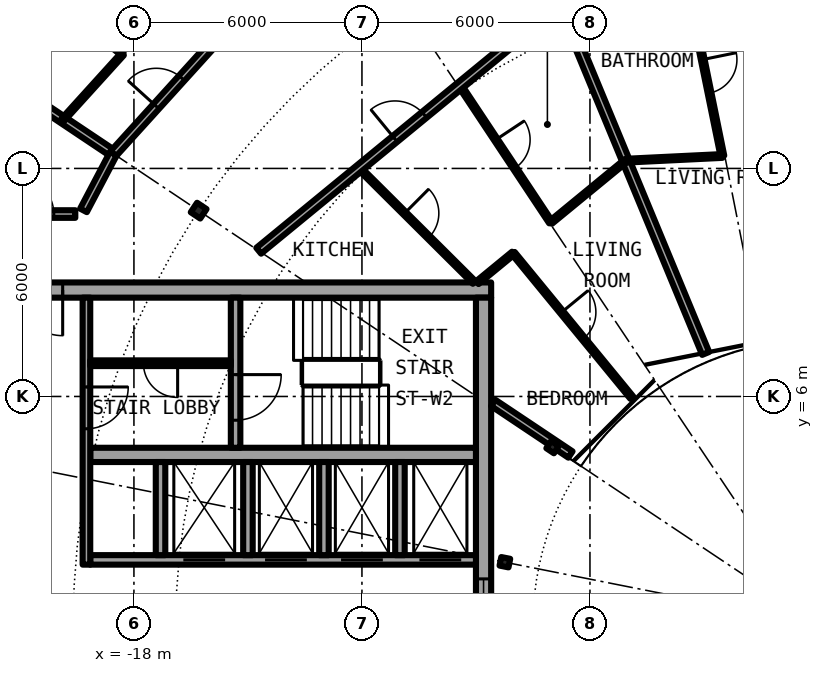
"""IFC4 building model, lengths in metres.
Left out: names, types, materials, properties, quantities, classifications, styles, units other than length and angle.
Written with IfcOpenShell. Run it as: python <this file> out.ifc"""

import sys

from ifc_helpers import new_model, si_unit, direction, frame, frame_2d, origin, origin_2d, place, context, subcontext, project, spatial, rectangle, i_section, extrude, element, fill, save


model = new_model("IFC4")
c1 = context("Model", 3, precision=1e-05, world=origin(), true_north=direction((0.0, 1.0)))
c2 = subcontext(c1, "Body", "Model", "MODEL_VIEW")
j1 = project(units=[si_unit("LENGTHUNIT", "METRE"), si_unit("PLANEANGLEUNIT", "RADIAN")], contexts=[c1])
p1 = place(None, origin())
s1 = spatial("IfcSite", under=j1, at=p1, CompositionType="ELEMENT")
p2 = place(p1, origin())
s2 = spatial("IfcBuilding", under=s1, at=p2, CompositionType="ELEMENT")
p3 = place(p2, frame((0.0, 0.0, 234.05)))
s3 = spatial("IfcBuildingStorey", under=s2, at=p3, CompositionType="ELEMENT", Elevation=234.05)
p4 = place(p3, frame((-16.297, 10.889, 0.0), z_axis=(0.0, 0.0, 1.0), x_axis=(-0.831469612303, 0.55557023302, 0.0)))
e1 = element("IfcColumn", 1, at=p4, inside=s3, PredefinedType="COLUMN", context=c2, shape_type="SweptSolid", body=[
    extrude(i_section(OverallWidth=0.3, OverallDepth=0.3, WebThickness=0.011, FlangeThickness=0.019, FilletRadius=0.027, at=origin_2d()), origin(), (0.0, 0.0, 1.0), 3.05),
])
for number, where, z_axis, x_axis in (
    (2, (-6.984, 4.667, 0.0), (0.0, 0.0, 1.0), (-0.831, 0.556, 0.0)),
    (3, (-8.239, 1.639, 0.0), (0.0, 0.0, 1.0), (-0.981, 0.195, 0.0)),
):
    element("IfcColumn", number, at=place(p3, frame(where, z_axis=z_axis, x_axis=x_axis)), inside=s3, PredefinedType="COLUMN", context=c2, shape_type="SweptSolid", body=[
        extrude(i_section(OverallWidth=0.24, OverallDepth=0.23, WebThickness=0.008, FlangeThickness=0.012, FilletRadius=0.021, at=origin_2d()), origin(), (0.0, 0.0, 1.0), 3.05),
    ])
p5 = place(p3, frame((-8.6, 8.8, 0.0), z_axis=(0.0, 0.0, 1.0), x_axis=(-1.0, 0.0, 0.0)))
e4 = element("IfcWall", 4, at=p5, inside=s3, PredefinedType="SHEAR", context=c2, shape_type="SweptSolid", body=[
    extrude(rectangle(XDim=13.4, YDim=0.4, at=frame_2d((6.7, 0.0))), origin(), (0.0, 0.0, 1.0), 3.05),
])
p6 = place(p5, frame((11.275, 0.0, 0.0)))
e5 = element("IfcOpeningElement", 5, at=p6, cuts=e4, PredefinedType="OPENING", context=c2, shape_type="SweptSolid", body=[
    extrude(rectangle(XDim=1.2, YDim=2.3, at=frame_2d((0.6, 1.15))), frame((0.0, 0.21, 0.0), z_axis=(0.0, -1.0, 0.0), x_axis=(1.0, 0.0, 0.0)), (0.0, 0.0, 1.0), 0.42),
])
p7 = place(p3, frame((-8.8, 8.6, 0.0), z_axis=(0.0, 0.0, 1.0), x_axis=(0.0, -1.0, 0.0)))
e6 = element("IfcWall", 6, at=p7, inside=s3, PredefinedType="SHEAR", context=c2, shape_type="SweptSolid", body=[
    extrude(rectangle(XDim=17.2, YDim=0.4, at=frame_2d((8.6, 0.0))), origin(), (0.0, 0.0, 1.0), 3.05),
])
p8 = place(p7, frame((7.4, 0.0, 0.1)))
e7 = element("IfcOpeningElement", 7, at=p8, cuts=e6, PredefinedType="OPENING", context=c2, shape_type="SweptSolid", body=[
    extrude(rectangle(XDim=2.4, YDim=2.2, at=frame_2d((1.2, 1.1))), frame((0.0, 0.21, 0.0), z_axis=(0.0, -1.0, 0.0), x_axis=(1.0, 0.0, 0.0)), (0.0, 0.0, 1.0), 0.42),
])
p9 = place(p3, frame((-9.0, 1.7, 0.0), z_axis=(0.0, 0.0, 1.0), x_axis=(-1.0, 0.0, 0.0)))
e8 = element("IfcWall", 8, at=p9, inside=s3, PredefinedType="SHEAR", context=c2, shape_type="SweptSolid", body=[
    extrude(rectangle(XDim=10.15, YDim=0.25, at=frame_2d((5.075, 0.0))), origin(), (0.0, 0.0, 1.0), 3.05),
])
p10 = place(p9, frame((0.387, 0.0, 0.0)))
e9 = element("IfcOpeningElement", 9, at=p10, cuts=e8, PredefinedType="OPENING", context=c2, shape_type="SweptSolid", body=[
    extrude(rectangle(XDim=1.1, YDim=2.3, at=frame_2d((0.55, 1.15))), frame((0.0, 0.135, 0.0), z_axis=(0.0, -1.0, 0.0), x_axis=(1.0, 0.0, 0.0)), (0.0, 0.0, 1.0), 0.27),
])
p11 = place(p9, frame((2.45, 0.0, 0.0)))
e10 = element("IfcOpeningElement", 10, at=p11, cuts=e8, PredefinedType="OPENING", context=c2, shape_type="SweptSolid", body=[
    extrude(rectangle(XDim=1.1, YDim=2.3, at=frame_2d((0.55, 1.15))), frame((0.0, 0.135, 0.0), z_axis=(0.0, -1.0, 0.0), x_axis=(1.0, 0.0, 0.0)), (0.0, 0.0, 1.0), 0.27),
])
p12 = place(p9, frame((4.45, 0.0, 0.0)))
e11 = element("IfcOpeningElement", 11, at=p12, cuts=e8, PredefinedType="OPENING", context=c2, shape_type="SweptSolid", body=[
    extrude(rectangle(XDim=1.1, YDim=2.3, at=frame_2d((0.55, 1.15))), frame((0.0, 0.135, 0.0), z_axis=(0.0, -1.0, 0.0), x_axis=(1.0, 0.0, 0.0)), (0.0, 0.0, 1.0), 0.27),
])
p13 = place(p9, frame((6.6, 0.0, 0.0)))
e12 = element("IfcOpeningElement", 12, at=p13, cuts=e8, PredefinedType="OPENING", context=c2, shape_type="SweptSolid", body=[
    extrude(rectangle(XDim=1.1, YDim=2.3, at=frame_2d((0.55, 1.15))), frame((0.0, 0.135, 0.0), z_axis=(0.0, -1.0, 0.0), x_axis=(1.0, 0.0, 0.0)), (0.0, 0.0, 1.0), 0.27),
])
p14 = place(p3, frame((-9.0, 4.462, 0.0), z_axis=(0.0, 0.0, 1.0), x_axis=(-1.0, 0.0, 0.0)))
e13 = element("IfcWall", 13, at=p14, inside=s3, PredefinedType="SHEAR", context=c2, shape_type="SweptSolid", body=[
    extrude(rectangle(XDim=10.15, YDim=0.375, at=frame_2d((5.075, 0.0))), origin(), (0.0, 0.0, 1.0), 3.05),
])
p15 = place(p3, frame((-15.325, 8.6, 0.0), z_axis=(0.0, 0.0, 1.0), x_axis=(0.0, -1.0, 0.0)))
e14 = element("IfcWall", 14, at=p15, inside=s3, PredefinedType="SHEAR", context=c2, shape_type="SweptSolid", body=[
    extrude(rectangle(XDim=3.95, YDim=0.25, at=frame_2d((1.975, 0.0))), origin(), (0.0, 0.0, 1.0), 3.05),
])
p16 = place(p15, frame((2.025, 0.0, 0.0)))
e15 = element("IfcOpeningElement", 15, at=p16, cuts=e14, PredefinedType="OPENING", context=c2, shape_type="SweptSolid", body=[
    extrude(rectangle(XDim=1.2, YDim=2.3, at=frame_2d((0.6, 1.15))), frame((0.0, 0.135, 0.0), z_axis=(0.0, -1.0, 0.0), x_axis=(1.0, 0.0, 0.0)), (0.0, 0.0, 1.0), 0.27),
])
for number, where, z_axis, x_axis in (
    (16, (-15.0, 1.825, 0.0), (0.0, 0.0, 1.0), (0.0, 1.0, 0.0)),
    (17, (-17.3, 1.825, 0.0), (0.0, 0.0, 1.0), (0.0, 1.0, 0.0)),
):
    element("IfcWall", number, at=place(p3, frame(where, z_axis=z_axis, x_axis=x_axis)), inside=s3, PredefinedType="SOLIDWALL", context=c2, shape_type="SweptSolid", body=[
        extrude(rectangle(XDim=2.45, YDim=0.25, at=frame_2d((1.225, 0.0))), origin(), (0.0, 0.0, 1.0), 2.7),
    ])
p17 = place(p3, frame((-19.25, 8.6, 0.0), z_axis=(0.0, 0.0, 1.0), x_axis=(0.0, -1.0, 0.0)))
e18 = element("IfcWall", 18, at=p17, inside=s3, PredefinedType="SOLIDWALL", context=c2, shape_type="SweptSolid", body=[
    extrude(rectangle(XDim=7.025, YDim=0.2, at=frame_2d((3.513, 0.0))), origin(), (0.0, 0.0, 1.0), 2.7),
])
p18 = place(p17, frame((2.35, 0.0, 0.0)))
e19 = element("IfcOpeningElement", 19, at=p18, cuts=e18, PredefinedType="OPENING", context=c2, shape_type="SweptSolid", body=[
    extrude(rectangle(XDim=1.1, YDim=2.3, at=frame_2d((0.55, 1.15))), frame((0.0, 0.11, 0.0), z_axis=(0.0, -1.0, 0.0), x_axis=(1.0, 0.0, 0.0)), (0.0, 0.0, 1.0), 0.22),
])
for number, where, z_axis, x_axis in (
    (20, (-11.0, 1.825, 0.0), (0.0, 0.0, 1.0), (0.0, 1.0, 0.0)),
    (21, (-13.0, 1.825, 0.0), (0.0, 0.0, 1.0), (0.0, 1.0, 0.0)),
):
    element("IfcWall", number, at=place(p3, frame(where, z_axis=z_axis, x_axis=x_axis)), inside=s3, PredefinedType="SOLIDWALL", context=c2, shape_type="SweptSolid", body=[
        extrude(rectangle(XDim=2.45, YDim=0.25, at=frame_2d((1.225, 0.0))), origin(), (0.0, 0.0, 1.0), 2.7),
    ])
p19 = place(p3, frame((-15.45, 6.875, 0.0), z_axis=(0.0, 0.0, 1.0), x_axis=(-1.0, 0.0, 0.0)))
e22 = element("IfcWall", 22, at=p19, inside=s3, PredefinedType="PARTITIONING", context=c2, shape_type="SweptSolid", body=[
    extrude(rectangle(XDim=3.7, YDim=0.15, at=frame_2d((1.85, 0.0))), origin(), (0.0, 0.0, 1.0), 2.7),
])
p20 = place(p19, frame((1.4, 0.0, 0.0)))
e23 = element("IfcOpeningElement", 23, at=p20, cuts=e22, PredefinedType="OPENING", context=c2, shape_type="SweptSolid", body=[
    extrude(rectangle(XDim=0.9, YDim=2.3, at=frame_2d((0.45, 1.15))), frame((0.0, 0.085, 0.0), z_axis=(0.0, -1.0, 0.0), x_axis=(1.0, 0.0, 0.0)), (0.0, 0.0, 1.0), 0.17),
])
p21 = place(p3, frame((-21.097, 14.097, 0.0), z_axis=(0.0, 0.0, 1.0), x_axis=(0.831340764735, -0.555763018642, 0.0)))
e24 = element("IfcWall", 24, at=p21, inside=s3, PredefinedType="PARTITIONING", context=c2, shape_type="SweptSolid", body=[
    extrude(rectangle(XDim=3.073, YDim=0.2, at=frame_2d((1.537, 0.0))), origin(), (0.0, 0.0, 1.0), 2.7),
])
p22 = place(p3, frame((-21.012, 17.233, 0.0), z_axis=(0.0, 0.0, 1.0), x_axis=(0.773165322764, -0.634204528267, 0.0)))
e25 = element("IfcWall", 25, at=p22, inside=s3, PredefinedType="PARTITIONING", context=c2, shape_type="SweptSolid", body=[
    extrude(rectangle(XDim=3.505, YDim=0.1, at=frame_2d((1.752, 0.0))), origin(), (0.0, 0.0, 1.0), 2.7),
])
p23 = place(p22, frame((1.303, 0.0, 0.0)))
e26 = element("IfcOpeningElement", 26, at=p23, cuts=e25, PredefinedType="OPENING", context=c2, shape_type="SweptSolid", body=[
    extrude(rectangle(XDim=0.9, YDim=2.3, at=frame_2d((0.45, 1.15))), frame((0.0, 0.06, 0.0), z_axis=(0.0, -1.0, 0.0), x_axis=(1.0, 0.0, 0.0)), (0.0, 0.0, 1.0), 0.12),
])
p24 = place(p3, frame((-12.069, 12.007, 0.0), z_axis=(0.0, 0.0, 1.0), x_axis=(0.708851268309, -0.705357979622, 0.0)))
e27 = element("IfcWall", 27, at=p24, inside=s3, PredefinedType="PARTITIONING", context=c2, shape_type="SweptSolid", body=[
    extrude(rectangle(XDim=4.263, YDim=0.1, at=frame_2d((2.132, 0.0))), origin(), (0.0, 0.0, 1.0), 2.7),
])
p25 = place(p24, frame((1.682, 0.0, 0.0)))
e28 = element("IfcOpeningElement", 28, at=p25, cuts=e27, PredefinedType="OPENING", context=c2, shape_type="SweptSolid", body=[
    extrude(rectangle(XDim=0.9, YDim=2.3, at=frame_2d((0.45, 1.15))), frame((0.0, 0.06, 0.0), z_axis=(0.0, -1.0, 0.0), x_axis=(1.0, 0.0, 0.0)), (0.0, 0.0, 1.0), 0.12),
])
p26 = place(p3, frame((-9.421, 14.18, 0.0), z_axis=(0.0, 0.0, 1.0), x_axis=(0.553303732327, -0.832979579457, 0.0)))
e29 = element("IfcWall", 29, at=p26, inside=s3, PredefinedType="PARTITIONING", context=c2, shape_type="SweptSolid", body=[
    extrude(rectangle(XDim=4.319, YDim=0.1, at=frame_2d((2.16, 0.0))), origin(), (0.0, 0.0, 1.0), 2.7),
])
p27 = place(p26, frame((1.71, 0.0, 0.0)))
e30 = element("IfcOpeningElement", 30, at=p27, cuts=e29, PredefinedType="OPENING", context=c2, shape_type="SweptSolid", body=[
    extrude(rectangle(XDim=0.9, YDim=2.3, at=frame_2d((0.45, 1.15))), frame((0.0, 0.06, 0.0), z_axis=(0.0, -1.0, 0.0), x_axis=(1.0, 0.0, 0.0)), (0.0, 0.0, 1.0), 0.12),
])
p28 = place(p3, frame((-8.019, 9.771, 0.0), z_axis=(0.0, 0.0, 1.0), x_axis=(0.634401778971, -0.773003481776, 0.0)))
e31 = element("IfcWall", 31, at=p28, inside=s3, PredefinedType="PARTITIONING", context=c2, shape_type="SweptSolid", body=[
    extrude(rectangle(XDim=4.92, YDim=0.1, at=frame_2d((2.46, 0.0))), origin(), (0.0, 0.0, 1.0), 2.7),
])
p29 = place(p28, frame((2.01, 0.0, 0.0)))
e32 = element("IfcOpeningElement", 32, at=p29, cuts=e31, PredefinedType="OPENING", context=c2, shape_type="SweptSolid", body=[
    extrude(rectangle(XDim=0.9, YDim=2.3, at=frame_2d((0.45, 1.15))), frame((0.0, 0.06, 0.0), z_axis=(0.0, -1.0, 0.0), x_axis=(1.0, 0.0, 0.0)), (0.0, 0.0, 1.0), 0.12),
])
p30 = place(p3, frame((-6.773, 16.353, 0.0), z_axis=(0.0, 0.0, 1.0), x_axis=(0.382549125466, -0.923935152814, 0.0)))
e33 = element("IfcWall", 33, at=p30, inside=s3, PredefinedType="PARTITIONING", context=c2, shape_type="SweptSolid", body=[
    extrude(rectangle(XDim=9.98, YDim=0.2, at=frame_2d((4.99, 0.0))), origin(), (0.0, 0.0, 1.0), 2.7),
])
p31 = place(p3, frame((-3.37, 16.52, 0.0), z_axis=(0.0, 0.0, 1.0), x_axis=(0.199889579004, -0.979818430224, 0.0)))
e34 = element("IfcWall", 34, at=p31, inside=s3, PredefinedType="PARTITIONING", context=c2, shape_type="SweptSolid", body=[
    extrude(rectangle(XDim=4.279, YDim=0.1, at=frame_2d((2.139, 0.0))), origin(), (0.0, 0.0, 1.0), 2.7),
])
p32 = place(p31, frame((1.689, 0.0, 0.0)))
e35 = element("IfcOpeningElement", 35, at=p32, cuts=e34, PredefinedType="OPENING", context=c2, shape_type="SweptSolid", body=[
    extrude(rectangle(XDim=0.9, YDim=2.3, at=frame_2d((0.45, 1.15))), frame((0.0, 0.06, 0.0), z_axis=(0.0, -1.0, 0.0), x_axis=(1.0, 0.0, 0.0)), (0.0, 0.0, 1.0), 0.12),
])
p33 = place(p3, frame((-6.513, 4.472, 0.0), z_axis=(0.0, 0.0, 1.0), x_axis=(-0.831450132577, 0.555599385382, 0.0)))
e36 = element("IfcWall", 36, at=p33, inside=s3, PredefinedType="PARTITIONING", context=c2, shape_type="SweptSolid", body=[
    extrude(rectangle(XDim=2.443, YDim=0.2, at=frame_2d((1.221, 0.0))), origin(), (0.0, 0.0, 1.0), 2.7),
])
p34 = place(p3, frame((-21.675, 10.8, 0.0), z_axis=(0.0, 0.0, 1.0), x_axis=(1.0, 0.0, 0.0)))
e37 = element("IfcWall", 37, at=p34, inside=s3, PredefinedType="PARTITIONING", context=c2, shape_type="SweptSolid", body=[
    extrude(rectangle(XDim=2.132, YDim=0.2, at=frame_2d((1.066, 0.0))), origin(), (0.0, 0.0, 1.0), 2.7),
])
p35 = place(p34, frame((0.566, 0.0, 0.0)))
e38 = element("IfcOpeningElement", 38, at=p35, cuts=e37, PredefinedType="OPENING", context=c2, shape_type="SweptSolid", body=[
    extrude(rectangle(XDim=1.0, YDim=2.3, at=frame_2d((0.5, 1.15))), frame((0.0, 0.11, 0.0), z_axis=(0.0, -1.0, 0.0), x_axis=(1.0, 0.0, 0.0)), (0.0, 0.0, 1.0), 0.22),
])
p36 = place(p3, frame((-5.055, 12.204, 0.0), z_axis=(0.0, 0.0, 1.0), x_axis=(0.998814742872, 0.048673498139, 0.0)))
e39 = element("IfcWall", 39, at=p36, inside=s3, PredefinedType="PARTITIONING", context=c2, shape_type="SweptSolid", body=[
    extrude(rectangle(XDim=2.543, YDim=0.1, at=frame_2d((1.271, 0.0))), origin(), (0.0, 0.0, 1.0), 2.7),
])
p37 = place(p3, frame((-8.963, 8.996, 0.0), z_axis=(0.0, 0.0, 1.0), x_axis=(0.772887322122, 0.63454329033, 0.0)))
e40 = element("IfcWall", 40, at=p37, inside=s3, PredefinedType="PARTITIONING", context=c2, shape_type="SweptSolid", body=[
    extrude(rectangle(XDim=1.221, YDim=0.1, at=frame_2d((0.611, 0.0))), origin(), (0.0, 0.0, 1.0), 2.7),
])
p38 = place(p3, frame((-7.032, 10.581, 0.0), z_axis=(0.0, 0.0, 1.0), x_axis=(0.772836687877, 0.634604958908, 0.0)))
e41 = element("IfcWall", 41, at=p38, inside=s3, PredefinedType="PARTITIONING", context=c2, shape_type="SweptSolid", body=[
    extrude(rectangle(XDim=2.556, YDim=0.1, at=frame_2d((1.278, 0.0))), origin(), (0.0, 0.0, 1.0), 2.7),
])
p39 = place(p3, frame((-14.717, 9.834, 0.0), z_axis=(0.0, 0.0, 1.0), x_axis=(0.773034536097, 0.634363938131, 0.0)))
e42 = element("IfcWall", 42, at=p39, inside=s3, PredefinedType="PARTITIONING", context=c2, shape_type="SweptSolid", body=[
    extrude(rectangle(XDim=10.277, YDim=0.2, at=frame_2d((5.138, 0.0))), origin(), (0.0, 0.0, 1.0), 2.7),
])
p40 = place(p39, frame((4.638, 0.0, 0.0)))
e43 = element("IfcOpeningElement", 43, at=p40, cuts=e42, PredefinedType="OPENING", context=c2, shape_type="SweptSolid", body=[
    extrude(rectangle(XDim=1.0, YDim=2.3, at=frame_2d((0.5, 1.15))), frame((0.0, 0.11, 0.0), z_axis=(0.0, -1.0, 0.0), x_axis=(1.0, 0.0, 0.0)), (0.0, 0.0, 1.0), 0.22),
])
p41 = place(p3, frame((-18.542, 12.389, 0.0), z_axis=(0.0, 0.0, 1.0), x_axis=(0.671561669125, 0.740948665268, 0.0)))
e44 = element("IfcWall", 44, at=p41, inside=s3, PredefinedType="PARTITIONING", context=c2, shape_type="SweptSolid", body=[
    extrude(rectangle(XDim=6.544, YDim=0.2, at=frame_2d((3.272, 0.0))), origin(), (0.0, 0.0, 1.0), 2.7),
])
p42 = place(p41, frame((1.682, 0.0, 0.0)))
e45 = element("IfcOpeningElement", 45, at=p42, cuts=e44, PredefinedType="OPENING", context=c2, shape_type="SweptSolid", body=[
    extrude(rectangle(XDim=1.0, YDim=2.3, at=frame_2d((0.5, 1.15))), frame((0.0, 0.11, 0.0), z_axis=(0.0, -1.0, 0.0), x_axis=(1.0, 0.0, 0.0)), (0.0, 0.0, 1.0), 0.22),
])
p43 = place(p3, frame((-19.328, 10.896, 0.0), z_axis=(0.0, 0.0, 1.0), x_axis=(0.465812036273, 0.88488369115, 0.0)))
e46 = element("IfcWall", 46, at=p43, inside=s3, PredefinedType="PARTITIONING", context=c2, shape_type="SweptSolid", body=[
    extrude(rectangle(XDim=1.687, YDim=0.2, at=frame_2d((0.844, 0.0))), origin(), (0.0, 0.0, 1.0), 2.7),
])
p44 = place(p3, frame((-19.872, 13.278, 0.0), z_axis=(0.0, 0.0, 1.0), x_axis=(0.671637685376, 0.740879760544, 0.0)))
e47 = element("IfcWall", 47, at=p44, inside=s3, PredefinedType="PARTITIONING", context=c2, shape_type="SweptSolid", body=[
    extrude(rectangle(XDim=2.338, YDim=0.1, at=frame_2d((1.169, 0.0))), origin(), (0.0, 0.0, 1.0), 2.7),
])
p45 = place(p10, origin())
e48 = element("IfcDoor", 48, at=p45, inside=s3, OperationType="DOUBLE_DOOR_SLIDING", PredefinedType="DOOR", context=c2, shape_type="SweptSolid", body=[
    extrude(rectangle(XDim=1.1, YDim=2.3, at=frame_2d((0.55, 1.15))), frame((0.0, 0.025, 0.0), z_axis=(0.0, -1.0, 0.0), x_axis=(1.0, 0.0, 0.0)), (0.0, 0.0, 1.0), 0.05),
])
fill(e9, e48)
p46 = place(p11, origin())
e49 = element("IfcDoor", 49, at=p46, inside=s3, OperationType="DOUBLE_DOOR_SLIDING", PredefinedType="DOOR", context=c2, shape_type="SweptSolid", body=[
    extrude(rectangle(XDim=1.1, YDim=2.3, at=frame_2d((0.55, 1.15))), frame((0.0, 0.025, 0.0), z_axis=(0.0, -1.0, 0.0), x_axis=(1.0, 0.0, 0.0)), (0.0, 0.0, 1.0), 0.05),
])
fill(e10, e49)
p47 = place(p12, origin())
e50 = element("IfcDoor", 50, at=p47, inside=s3, OperationType="DOUBLE_DOOR_SLIDING", PredefinedType="DOOR", context=c2, shape_type="SweptSolid", body=[
    extrude(rectangle(XDim=1.1, YDim=2.3, at=frame_2d((0.55, 1.15))), frame((0.0, 0.025, 0.0), z_axis=(0.0, -1.0, 0.0), x_axis=(1.0, 0.0, 0.0)), (0.0, 0.0, 1.0), 0.05),
])
fill(e11, e50)
p48 = place(p13, origin())
e51 = element("IfcDoor", 51, at=p48, inside=s3, OperationType="DOUBLE_DOOR_SLIDING", PredefinedType="DOOR", context=c2, shape_type="SweptSolid", body=[
    extrude(rectangle(XDim=1.1, YDim=2.3, at=frame_2d((0.55, 1.15))), frame((0.0, 0.025, 0.0), z_axis=(0.0, -1.0, 0.0), x_axis=(1.0, 0.0, 0.0)), (0.0, 0.0, 1.0), 0.05),
])
fill(e12, e51)
p49 = place(p20, origin())
e52 = element("IfcDoor", 52, at=p49, inside=s3, OperationType="SINGLE_SWING_LEFT", PredefinedType="DOOR", context=c2, shape_type="SweptSolid", body=[
    extrude(rectangle(XDim=0.9, YDim=2.3, at=frame_2d((0.45, 1.15))), frame((0.0, 0.025, 0.0), z_axis=(0.0, -1.0, 0.0), x_axis=(1.0, 0.0, 0.0)), (0.0, 0.0, 1.0), 0.05),
])
fill(e23, e52)
p50 = place(p16, origin())
e53 = element("IfcDoor", 53, at=p50, inside=s3, OperationType="SINGLE_SWING_LEFT", PredefinedType="DOOR", context=c2, shape_type="SweptSolid", body=[
    extrude(rectangle(XDim=1.2, YDim=2.3, at=frame_2d((0.6, 1.15))), frame((0.0, 0.025, 0.0), z_axis=(0.0, -1.0, 0.0), x_axis=(1.0, 0.0, 0.0)), (0.0, 0.0, 1.0), 0.05),
])
fill(e15, e53)
p51 = place(p18, origin())
e54 = element("IfcDoor", 54, at=p51, inside=s3, OperationType="SINGLE_SWING_RIGHT", PredefinedType="DOOR", context=c2, shape_type="SweptSolid", body=[
    extrude(rectangle(XDim=1.1, YDim=2.3, at=frame_2d((0.55, 1.15))), frame((0.0, 0.025, 0.0), z_axis=(0.0, -1.0, 0.0), x_axis=(1.0, 0.0, 0.0)), (0.0, 0.0, 1.0), 0.05),
])
fill(e19, e54)
p52 = place(p6, origin())
e55 = element("IfcDoor", 55, at=p52, inside=s3, OperationType="SINGLE_SWING_LEFT", PredefinedType="DOOR", context=c2, shape_type="SweptSolid", body=[
    extrude(rectangle(XDim=1.2, YDim=2.3, at=frame_2d((0.6, 1.15))), frame((0.0, 0.025, 0.0), z_axis=(0.0, -1.0, 0.0), x_axis=(1.0, 0.0, 0.0)), (0.0, 0.0, 1.0), 0.05),
])
fill(e5, e55)
p53 = place(p8, origin())
e56 = element("IfcWindow", 56, at=p53, inside=s3, PartitioningType="SINGLE_PANEL", PredefinedType="WINDOW", context=c2, shape_type="SweptSolid", body=[
    extrude(rectangle(XDim=2.4, YDim=2.2, at=frame_2d((1.2, 1.1))), frame((0.0, 0.03, 0.0), z_axis=(0.0, -1.0, 0.0), x_axis=(1.0, 0.0, 0.0)), (0.0, 0.0, 1.0), 0.06),
])
fill(e7, e56)
p54 = place(p42, origin())
e57 = element("IfcDoor", 57, at=p54, inside=s3, OperationType="SINGLE_SWING_LEFT", PredefinedType="DOOR", context=c2, shape_type="SweptSolid", body=[
    extrude(rectangle(XDim=1.0, YDim=2.3, at=frame_2d((0.5, 1.15))), frame((0.0, 0.025, 0.0), z_axis=(0.0, -1.0, 0.0), x_axis=(1.0, 0.0, 0.0)), (0.0, 0.0, 1.0), 0.05),
])
fill(e45, e57)
p55 = place(p32, origin())
e58 = element("IfcDoor", 58, at=p55, inside=s3, OperationType="SINGLE_SWING_RIGHT", PredefinedType="DOOR", context=c2, shape_type="SweptSolid", body=[
    extrude(rectangle(XDim=0.9, YDim=2.3, at=frame_2d((0.45, 1.15))), frame((0.0, 0.025, 0.0), z_axis=(0.0, -1.0, 0.0), x_axis=(1.0, 0.0, 0.0)), (0.0, 0.0, 1.0), 0.05),
])
fill(e35, e58)
p56 = place(p40, origin())
e59 = element("IfcDoor", 59, at=p56, inside=s3, OperationType="SINGLE_SWING_LEFT", PredefinedType="DOOR", context=c2, shape_type="SweptSolid", body=[
    extrude(rectangle(XDim=1.0, YDim=2.3, at=frame_2d((0.5, 1.15))), frame((0.0, 0.025, 0.0), z_axis=(0.0, -1.0, 0.0), x_axis=(1.0, 0.0, 0.0)), (0.0, 0.0, 1.0), 0.05),
])
fill(e43, e59)
p57 = place(p27, origin())
e60 = element("IfcDoor", 60, at=p57, inside=s3, OperationType="SINGLE_SWING_RIGHT", PredefinedType="DOOR", context=c2, shape_type="SweptSolid", body=[
    extrude(rectangle(XDim=0.9, YDim=2.3, at=frame_2d((0.45, 1.15))), frame((0.0, 0.025, 0.0), z_axis=(0.0, -1.0, 0.0), x_axis=(1.0, 0.0, 0.0)), (0.0, 0.0, 1.0), 0.05),
])
fill(e30, e60)
p58 = place(p25, origin())
e61 = element("IfcDoor", 61, at=p58, inside=s3, OperationType="SINGLE_SWING_RIGHT", PredefinedType="DOOR", context=c2, shape_type="SweptSolid", body=[
    extrude(rectangle(XDim=0.9, YDim=2.3, at=frame_2d((0.45, 1.15))), frame((0.0, 0.025, 0.0), z_axis=(0.0, -1.0, 0.0), x_axis=(1.0, 0.0, 0.0)), (0.0, 0.0, 1.0), 0.05),
])
fill(e28, e61)
p59 = place(p29, origin())
e62 = element("IfcDoor", 62, at=p59, inside=s3, OperationType="SINGLE_SWING_RIGHT", PredefinedType="DOOR", context=c2, shape_type="SweptSolid", body=[
    extrude(rectangle(XDim=0.9, YDim=2.3, at=frame_2d((0.45, 1.15))), frame((0.0, 0.025, 0.0), z_axis=(0.0, -1.0, 0.0), x_axis=(1.0, 0.0, 0.0)), (0.0, 0.0, 1.0), 0.05),
])
fill(e32, e62)
p60 = place(p35, origin())
e63 = element("IfcDoor", 63, at=p60, inside=s3, OperationType="SINGLE_SWING_LEFT", PredefinedType="DOOR", context=c2, shape_type="SweptSolid", body=[
    extrude(rectangle(XDim=1.0, YDim=2.3, at=frame_2d((0.5, 1.15))), frame((0.0, 0.025, 0.0), z_axis=(0.0, -1.0, 0.0), x_axis=(1.0, 0.0, 0.0)), (0.0, 0.0, 1.0), 0.05),
])
fill(e38, e63)
save(model, sys.argv[1])
